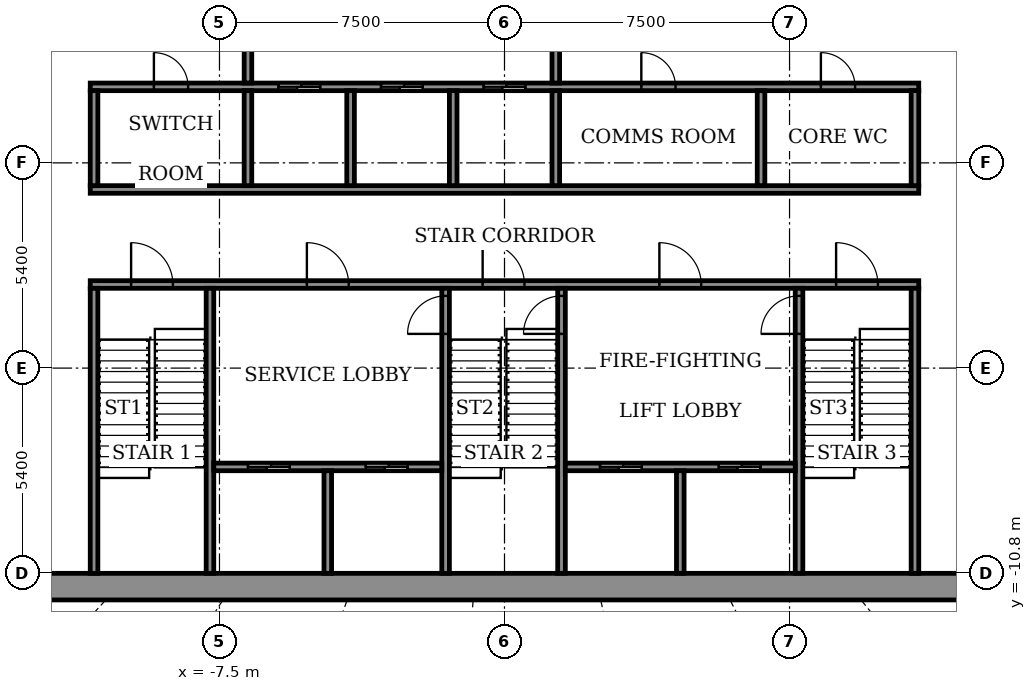
"""IFC4 building model, lengths in metres.
Left out: names, types, materials, properties, quantities, classifications, styles, units other than length and angle.
Written with IfcOpenShell. Run it as: python <this file> out.ifc"""

import sys

from ifc_helpers import new_model, si_unit, direction, frame, frame_2d, origin, place, context, subcontext, project, spatial, rectangle, extrude, element, fill, save


model = new_model("IFC4")
c1 = context("Model", 3, precision=1e-05, world=origin(), true_north=direction((0.0, 1.0)))
c2 = subcontext(c1, "Body", "Model", "MODEL_VIEW")
j1 = project(units=[si_unit("LENGTHUNIT", "METRE"), si_unit("PLANEANGLEUNIT", "RADIAN")], contexts=[c1])
p1 = place(None, origin())
s1 = spatial("IfcSite", under=j1, at=p1, CompositionType="ELEMENT")
p2 = place(p1, origin())
s2 = spatial("IfcBuilding", under=s1, at=p2, CompositionType="ELEMENT")
p3 = place(p2, frame((0.0, 0.0, 275.3)))
s3 = spatial("IfcBuildingStorey", under=s2, at=p3, CompositionType="ELEMENT", Elevation=275.3)
p4 = place(p3, frame((-14.5, -11.15, 0.0), z_axis=(0.0, 0.0, 1.0), x_axis=(1.0, 0.0, 0.0)))
e1 = element("IfcWall", 1, at=p4, inside=s3, PredefinedType="SHEAR", context=c2, shape_type="SweptSolid", body=[
    extrude(rectangle(XDim=29.0, YDim=0.7, at=frame_2d((14.5, 0.0))), origin(), (0.0, 0.0, 1.0), 4.6),
])
p5 = place(p3, frame((-10.9, -3.2, 0.0), z_axis=(0.0, 0.0, 1.0), x_axis=(1.0, 0.0, 0.0)))
e2 = element("IfcWall", 2, at=p5, inside=s3, PredefinedType="SHEAR", context=c2, shape_type="SweptSolid", body=[
    extrude(rectangle(XDim=21.8, YDim=0.2, at=frame_2d((10.9, 0.0))), origin(), (0.0, 0.0, 1.0), 4.05),
])
p6 = place(p5, frame((1.075, 0.0, 0.0)))
e3 = element("IfcOpeningElement", 3, at=p6, cuts=e2, PredefinedType="OPENING", context=c2, shape_type="SweptSolid", body=[
    extrude(rectangle(XDim=1.1, YDim=2.1, at=frame_2d((0.55, 1.05))), frame((0.0, 0.11, 0.0), z_axis=(0.0, -1.0, 0.0), x_axis=(1.0, 0.0, 0.0)), (0.0, 0.0, 1.0), 0.22),
])
p7 = place(p5, frame((10.325, 0.0, 0.0)))
e4 = element("IfcOpeningElement", 4, at=p7, cuts=e2, PredefinedType="OPENING", context=c2, shape_type="SweptSolid", body=[
    extrude(rectangle(XDim=1.1, YDim=2.1, at=frame_2d((0.55, 1.05))), frame((0.0, 0.11, 0.0), z_axis=(0.0, -1.0, 0.0), x_axis=(1.0, 0.0, 0.0)), (0.0, 0.0, 1.0), 0.22),
])
p8 = place(p5, frame((19.625, 0.0, 0.0)))
e5 = element("IfcOpeningElement", 5, at=p8, cuts=e2, PredefinedType="OPENING", context=c2, shape_type="SweptSolid", body=[
    extrude(rectangle(XDim=1.1, YDim=2.1, at=frame_2d((0.55, 1.05))), frame((0.0, 0.11, 0.0), z_axis=(0.0, -1.0, 0.0), x_axis=(1.0, 0.0, 0.0)), (0.0, 0.0, 1.0), 0.22),
])
p9 = place(p5, frame((5.7, 0.0, 0.0)))
e6 = element("IfcOpeningElement", 6, at=p9, cuts=e2, PredefinedType="OPENING", context=c2, shape_type="SweptSolid", body=[
    extrude(rectangle(XDim=1.1, YDim=2.1, at=frame_2d((0.55, 1.05))), frame((0.0, 0.11, 0.0), z_axis=(0.0, -1.0, 0.0), x_axis=(1.0, 0.0, 0.0)), (0.0, 0.0, 1.0), 0.22),
])
p10 = place(p5, frame((14.975, 0.0, 0.0)))
e7 = element("IfcOpeningElement", 7, at=p10, cuts=e2, PredefinedType="OPENING", context=c2, shape_type="SweptSolid", body=[
    extrude(rectangle(XDim=1.1, YDim=2.1, at=frame_2d((0.55, 1.05))), frame((0.0, 0.11, 0.0), z_axis=(0.0, -1.0, 0.0), x_axis=(1.0, 0.0, 0.0)), (0.0, 0.0, 1.0), 0.22),
])
p11 = place(p3, frame((-10.9, -0.7, 0.0), z_axis=(0.0, 0.0, 1.0), x_axis=(1.0, 0.0, 0.0)))
e8 = element("IfcWall", 8, at=p11, inside=s3, PredefinedType="SHEAR", context=c2, shape_type="SweptSolid", body=[
    extrude(rectangle(XDim=21.8, YDim=0.2, at=frame_2d((10.9, 0.0))), origin(), (0.0, 0.0, 1.0), 4.05),
])
p12 = place(p3, frame((-10.9, 2.0, 0.0), z_axis=(0.0, 0.0, 1.0), x_axis=(1.0, 0.0, 0.0)))
e9 = element("IfcWall", 9, at=p12, inside=s3, PredefinedType="SHEAR", context=c2, shape_type="SweptSolid", body=[
    extrude(rectangle(XDim=21.8, YDim=0.2, at=frame_2d((10.9, 0.0))), origin(), (0.0, 0.0, 1.0), 4.05),
])
p13 = place(p12, frame((4.95, 0.0, 0.0)))
e10 = element("IfcOpeningElement", 10, at=p13, cuts=e9, PredefinedType="OPENING", context=c2, shape_type="SweptSolid", body=[
    extrude(rectangle(XDim=1.1, YDim=2.1, at=frame_2d((0.55, 1.05))), frame((0.0, 0.11, 0.0), z_axis=(0.0, -1.0, 0.0), x_axis=(1.0, 0.0, 0.0)), (0.0, 0.0, 1.0), 0.22),
])
p14 = place(p12, frame((7.65, 0.0, 0.0)))
e11 = element("IfcOpeningElement", 11, at=p14, cuts=e9, PredefinedType="OPENING", context=c2, shape_type="SweptSolid", body=[
    extrude(rectangle(XDim=1.1, YDim=2.1, at=frame_2d((0.55, 1.05))), frame((0.0, 0.11, 0.0), z_axis=(0.0, -1.0, 0.0), x_axis=(1.0, 0.0, 0.0)), (0.0, 0.0, 1.0), 0.22),
])
p15 = place(p12, frame((10.35, 0.0, 0.0)))
e12 = element("IfcOpeningElement", 12, at=p15, cuts=e9, PredefinedType="OPENING", context=c2, shape_type="SweptSolid", body=[
    extrude(rectangle(XDim=1.1, YDim=2.1, at=frame_2d((0.55, 1.05))), frame((0.0, 0.11, 0.0), z_axis=(0.0, -1.0, 0.0), x_axis=(1.0, 0.0, 0.0)), (0.0, 0.0, 1.0), 0.22),
])
p16 = place(p12, frame((1.675, 0.0, 0.0)))
e13 = element("IfcOpeningElement", 13, at=p16, cuts=e9, PredefinedType="OPENING", context=c2, shape_type="SweptSolid", body=[
    extrude(rectangle(XDim=0.9, YDim=2.1, at=frame_2d((0.45, 1.05))), frame((0.0, 0.11, 0.0), z_axis=(0.0, -1.0, 0.0), x_axis=(1.0, 0.0, 0.0)), (0.0, 0.0, 1.0), 0.22),
])
p17 = place(p12, frame((14.5, 0.0, 0.0)))
e14 = element("IfcOpeningElement", 14, at=p17, cuts=e9, PredefinedType="OPENING", context=c2, shape_type="SweptSolid", body=[
    extrude(rectangle(XDim=0.9, YDim=2.1, at=frame_2d((0.45, 1.05))), frame((0.0, 0.11, 0.0), z_axis=(0.0, -1.0, 0.0), x_axis=(1.0, 0.0, 0.0)), (0.0, 0.0, 1.0), 0.22),
])
p18 = place(p12, frame((19.225, 0.0, 0.0)))
e15 = element("IfcOpeningElement", 15, at=p18, cuts=e9, PredefinedType="OPENING", context=c2, shape_type="SweptSolid", body=[
    extrude(rectangle(XDim=0.9, YDim=2.1, at=frame_2d((0.45, 1.05))), frame((0.0, 0.11, 0.0), z_axis=(0.0, -1.0, 0.0), x_axis=(1.0, 0.0, 0.0)), (0.0, 0.0, 1.0), 0.22),
])
for number, where, z_axis, x_axis in (
    (16, (-10.8, -10.8, 0.0), (0.0, 0.0, 1.0), (0.0, 1.0, 0.0)),
    (17, (-7.75, -10.8, 0.0), (0.0, 0.0, 1.0), (0.0, 1.0, 0.0)),
):
    element("IfcWall", number, at=place(p3, frame(where, z_axis=z_axis, x_axis=x_axis)), inside=s3, PredefinedType="SHEAR", context=c2, shape_type="SweptSolid", body=[
        extrude(rectangle(XDim=7.5, YDim=0.2, at=frame_2d((3.75, 0.0))), origin(), (0.0, 0.0, 1.0), 4.05),
    ])
p19 = place(p3, frame((-1.55, -10.8, 0.0), z_axis=(0.0, 0.0, 1.0), x_axis=(0.0, 1.0, 0.0)))
e18 = element("IfcWall", 18, at=p19, inside=s3, PredefinedType="SHEAR", context=c2, shape_type="SweptSolid", body=[
    extrude(rectangle(XDim=7.5, YDim=0.2, at=frame_2d((3.75, 0.0))), origin(), (0.0, 0.0, 1.0), 4.05),
])
p20 = place(p19, frame((6.3, 0.0, 0.0)))
e19 = element("IfcOpeningElement", 19, at=p20, cuts=e18, PredefinedType="OPENING", context=c2, shape_type="SweptSolid", body=[
    extrude(rectangle(XDim=1.0, YDim=2.1, at=frame_2d((0.5, 1.05))), frame((0.0, 0.11, 0.0), z_axis=(0.0, -1.0, 0.0), x_axis=(1.0, 0.0, 0.0)), (0.0, 0.0, 1.0), 0.22),
])
p21 = place(p3, frame((1.5, -10.8, 0.0), z_axis=(0.0, 0.0, 1.0), x_axis=(0.0, 1.0, 0.0)))
e20 = element("IfcWall", 20, at=p21, inside=s3, PredefinedType="SHEAR", context=c2, shape_type="SweptSolid", body=[
    extrude(rectangle(XDim=7.5, YDim=0.2, at=frame_2d((3.75, 0.0))), origin(), (0.0, 0.0, 1.0), 4.05),
])
p22 = place(p21, frame((6.3, 0.0, 0.0)))
e21 = element("IfcOpeningElement", 21, at=p22, cuts=e20, PredefinedType="OPENING", context=c2, shape_type="SweptSolid", body=[
    extrude(rectangle(XDim=1.0, YDim=2.1, at=frame_2d((0.5, 1.05))), frame((0.0, 0.11, 0.0), z_axis=(0.0, -1.0, 0.0), x_axis=(1.0, 0.0, 0.0)), (0.0, 0.0, 1.0), 0.22),
])
p23 = place(p3, frame((7.75, -10.8, 0.0), z_axis=(0.0, 0.0, 1.0), x_axis=(0.0, 1.0, 0.0)))
e22 = element("IfcWall", 22, at=p23, inside=s3, PredefinedType="SHEAR", context=c2, shape_type="SweptSolid", body=[
    extrude(rectangle(XDim=7.5, YDim=0.2, at=frame_2d((3.75, 0.0))), origin(), (0.0, 0.0, 1.0), 4.05),
])
p24 = place(p23, frame((6.3, 0.0, 0.0)))
e23 = element("IfcOpeningElement", 23, at=p24, cuts=e22, PredefinedType="OPENING", context=c2, shape_type="SweptSolid", body=[
    extrude(rectangle(XDim=1.0, YDim=2.1, at=frame_2d((0.5, 1.05))), frame((0.0, 0.11, 0.0), z_axis=(0.0, -1.0, 0.0), x_axis=(1.0, 0.0, 0.0)), (0.0, 0.0, 1.0), 0.22),
])
p25 = place(p3, frame((10.8, -10.8, 0.0), z_axis=(0.0, 0.0, 1.0), x_axis=(0.0, 1.0, 0.0)))
e24 = element("IfcWall", 24, at=p25, inside=s3, PredefinedType="SHEAR", context=c2, shape_type="SweptSolid", body=[
    extrude(rectangle(XDim=7.5, YDim=0.2, at=frame_2d((3.75, 0.0))), origin(), (0.0, 0.0, 1.0), 4.05),
])
p26 = place(p3, frame((-7.65, -8.0, 0.0), z_axis=(0.0, 0.0, 1.0), x_axis=(1.0, 0.0, 0.0)))
e25 = element("IfcWall", 25, at=p26, inside=s3, PredefinedType="SHEAR", context=c2, shape_type="SweptSolid", body=[
    extrude(rectangle(XDim=6.0, YDim=0.2, at=frame_2d((3.0, 0.0))), origin(), (0.0, 0.0, 1.0), 4.05),
])
p27 = place(p26, frame((0.9, 0.0, 0.0)))
e26 = element("IfcOpeningElement", 26, at=p27, cuts=e25, PredefinedType="OPENING", context=c2, shape_type="SweptSolid", body=[
    extrude(rectangle(XDim=1.1, YDim=2.1, at=frame_2d((0.55, 1.05))), frame((0.0, 0.11, 0.0), z_axis=(0.0, -1.0, 0.0), x_axis=(1.0, 0.0, 0.0)), (0.0, 0.0, 1.0), 0.22),
])
p28 = place(p26, frame((4.0, 0.0, 0.0)))
e27 = element("IfcOpeningElement", 27, at=p28, cuts=e25, PredefinedType="OPENING", context=c2, shape_type="SweptSolid", body=[
    extrude(rectangle(XDim=1.1, YDim=2.1, at=frame_2d((0.55, 1.05))), frame((0.0, 0.11, 0.0), z_axis=(0.0, -1.0, 0.0), x_axis=(1.0, 0.0, 0.0)), (0.0, 0.0, 1.0), 0.22),
])
p29 = place(p3, frame((-4.65, -10.8, 0.0), z_axis=(0.0, 0.0, 1.0), x_axis=(0.0, 1.0, 0.0)))
e28 = element("IfcWall", 28, at=p29, inside=s3, PredefinedType="SHEAR", context=c2, shape_type="SweptSolid", body=[
    extrude(rectangle(XDim=2.7, YDim=0.2, at=frame_2d((1.35, 0.0))), origin(), (0.0, 0.0, 1.0), 4.05),
])
p30 = place(p3, frame((1.6, -8.0, 0.0), z_axis=(0.0, 0.0, 1.0), x_axis=(1.0, 0.0, 0.0)))
e29 = element("IfcWall", 29, at=p30, inside=s3, PredefinedType="SHEAR", context=c2, shape_type="SweptSolid", body=[
    extrude(rectangle(XDim=6.05, YDim=0.2, at=frame_2d((3.025, 0.0))), origin(), (0.0, 0.0, 1.0), 4.05),
])
p31 = place(p30, frame((0.913, 0.0, 0.0)))
e30 = element("IfcOpeningElement", 30, at=p31, cuts=e29, PredefinedType="OPENING", context=c2, shape_type="SweptSolid", body=[
    extrude(rectangle(XDim=1.1, YDim=2.1, at=frame_2d((0.55, 1.05))), frame((0.0, 0.11, 0.0), z_axis=(0.0, -1.0, 0.0), x_axis=(1.0, 0.0, 0.0)), (0.0, 0.0, 1.0), 0.22),
])
p32 = place(p30, frame((4.038, 0.0, 0.0)))
e31 = element("IfcOpeningElement", 31, at=p32, cuts=e29, PredefinedType="OPENING", context=c2, shape_type="SweptSolid", body=[
    extrude(rectangle(XDim=1.1, YDim=2.1, at=frame_2d((0.55, 1.05))), frame((0.0, 0.11, 0.0), z_axis=(0.0, -1.0, 0.0), x_axis=(1.0, 0.0, 0.0)), (0.0, 0.0, 1.0), 0.22),
])
p33 = place(p3, frame((4.625, -10.8, 0.0), z_axis=(0.0, 0.0, 1.0), x_axis=(0.0, 1.0, 0.0)))
e32 = element("IfcWall", 32, at=p33, inside=s3, PredefinedType="SHEAR", context=c2, shape_type="SweptSolid", body=[
    extrude(rectangle(XDim=2.7, YDim=0.2, at=frame_2d((1.35, 0.0))), origin(), (0.0, 0.0, 1.0), 4.05),
])
p34 = place(p3, frame((-10.8, -0.6, 0.0), z_axis=(0.0, 0.0, 1.0), x_axis=(0.0, 1.0, 0.0)))
e33 = element("IfcWall", 33, at=p34, inside=s3, PredefinedType="STANDARD", context=c2, shape_type="SweptSolid", body=[
    extrude(rectangle(XDim=2.5, YDim=0.2, at=frame_2d((1.25, 0.0))), origin(), (0.0, 0.0, 1.0), 4.05),
])
for number, where, z_axis, x_axis in (
    (34, (-6.75, -0.6, 0.0), (0.0, 0.0, 1.0), (0.0, 1.0, 0.0)),
    (35, (-4.05, -0.6, 0.0), (0.0, 0.0, 1.0), (0.0, 1.0, 0.0)),
    (36, (-1.35, -0.6, 0.0), (0.0, 0.0, 1.0), (0.0, 1.0, 0.0)),
    (37, (1.35, -0.6, 0.0), (0.0, 0.0, 1.0), (0.0, 1.0, 0.0)),
):
    element("IfcWall", number, at=place(p3, frame(where, z_axis=z_axis, x_axis=x_axis)), inside=s3, PredefinedType="SHEAR", context=c2, shape_type="SweptSolid", body=[
        extrude(rectangle(XDim=2.5, YDim=0.2, at=frame_2d((1.25, 0.0))), origin(), (0.0, 0.0, 1.0), 4.05),
    ])
for number, where, z_axis, x_axis in (
    (38, (6.75, -0.6, 0.0), (0.0, 0.0, 1.0), (0.0, 1.0, 0.0)),
    (39, (10.8, -0.6, 0.0), (0.0, 0.0, 1.0), (0.0, 1.0, 0.0)),
):
    element("IfcWall", number, at=place(p3, frame(where, z_axis=z_axis, x_axis=x_axis)), inside=s3, PredefinedType="STANDARD", context=c2, shape_type="SweptSolid", body=[
        extrude(rectangle(XDim=2.5, YDim=0.2, at=frame_2d((1.25, 0.0))), origin(), (0.0, 0.0, 1.0), 4.05),
    ])
p35 = place(p3, frame((-6.75, 2.1, 0.0), z_axis=(0.0, 0.0, 1.0), x_axis=(0.0, 1.0, 0.0)))
e40 = element("IfcWall", 40, at=p35, inside=s3, PredefinedType="STANDARD", context=c2, shape_type="SweptSolid", body=[
    extrude(rectangle(XDim=5.9, YDim=0.2, at=frame_2d((2.95, 0.0))), origin(), (0.0, 0.0, 1.0), 4.05),
])
p36 = place(p35, frame((2.35, 0.0, 0.0)))
e41 = element("IfcOpeningElement", 41, at=p36, cuts=e40, PredefinedType="OPENING", context=c2, shape_type="SweptSolid", body=[
    extrude(rectangle(XDim=1.2, YDim=2.1, at=frame_2d((0.6, 1.05))), frame((0.0, 0.11, 0.0), z_axis=(0.0, -1.0, 0.0), x_axis=(1.0, 0.0, 0.0)), (0.0, 0.0, 1.0), 0.22),
])
p37 = place(p3, frame((1.35, 2.1, 0.0), z_axis=(0.0, 0.0, 1.0), x_axis=(0.0, 1.0, 0.0)))
e42 = element("IfcWall", 42, at=p37, inside=s3, PredefinedType="STANDARD", context=c2, shape_type="SweptSolid", body=[
    extrude(rectangle(XDim=5.9, YDim=0.2, at=frame_2d((2.95, 0.0))), origin(), (0.0, 0.0, 1.0), 4.05),
])
p38 = place(p37, frame((2.35, 0.0, 0.0)))
e43 = element("IfcOpeningElement", 43, at=p38, cuts=e42, PredefinedType="OPENING", context=c2, shape_type="SweptSolid", body=[
    extrude(rectangle(XDim=1.2, YDim=2.1, at=frame_2d((0.6, 1.05))), frame((0.0, 0.11, 0.0), z_axis=(0.0, -1.0, 0.0), x_axis=(1.0, 0.0, 0.0)), (0.0, 0.0, 1.0), 0.22),
])
p39 = place(p13, origin())
e44 = element("IfcDoor", 44, at=p39, inside=s3, OperationType="SLIDING_TO_LEFT", PredefinedType="DOOR", context=c2, shape_type="SweptSolid", body=[
    extrude(rectangle(XDim=1.1, YDim=2.1, at=frame_2d((0.55, 1.05))), frame((0.0, 0.025, 0.0), z_axis=(0.0, -1.0, 0.0), x_axis=(1.0, 0.0, 0.0)), (0.0, 0.0, 1.0), 0.05),
])
fill(e10, e44)
p40 = place(p14, origin())
e45 = element("IfcDoor", 45, at=p40, inside=s3, OperationType="SLIDING_TO_LEFT", PredefinedType="DOOR", context=c2, shape_type="SweptSolid", body=[
    extrude(rectangle(XDim=1.1, YDim=2.1, at=frame_2d((0.55, 1.05))), frame((0.0, 0.025, 0.0), z_axis=(0.0, -1.0, 0.0), x_axis=(1.0, 0.0, 0.0)), (0.0, 0.0, 1.0), 0.05),
])
fill(e11, e45)
p41 = place(p15, origin())
e46 = element("IfcDoor", 46, at=p41, inside=s3, OperationType="SLIDING_TO_LEFT", PredefinedType="DOOR", context=c2, shape_type="SweptSolid", body=[
    extrude(rectangle(XDim=1.1, YDim=2.1, at=frame_2d((0.55, 1.05))), frame((0.0, 0.025, 0.0), z_axis=(0.0, -1.0, 0.0), x_axis=(1.0, 0.0, 0.0)), (0.0, 0.0, 1.0), 0.05),
])
fill(e12, e46)
p42 = place(p16, origin())
e47 = element("IfcDoor", 47, at=p42, inside=s3, OperationType="SINGLE_SWING_LEFT", PredefinedType="DOOR", context=c2, shape_type="SweptSolid", body=[
    extrude(rectangle(XDim=0.9, YDim=2.1, at=frame_2d((0.45, 1.05))), frame((0.0, 0.025, 0.0), z_axis=(0.0, -1.0, 0.0), x_axis=(1.0, 0.0, 0.0)), (0.0, 0.0, 1.0), 0.05),
])
fill(e13, e47)
p43 = place(p17, origin())
e48 = element("IfcDoor", 48, at=p43, inside=s3, OperationType="SINGLE_SWING_LEFT", PredefinedType="DOOR", context=c2, shape_type="SweptSolid", body=[
    extrude(rectangle(XDim=0.9, YDim=2.1, at=frame_2d((0.45, 1.05))), frame((0.0, 0.025, 0.0), z_axis=(0.0, -1.0, 0.0), x_axis=(1.0, 0.0, 0.0)), (0.0, 0.0, 1.0), 0.05),
])
fill(e14, e48)
p44 = place(p18, origin())
e49 = element("IfcDoor", 49, at=p44, inside=s3, OperationType="SINGLE_SWING_RIGHT", PredefinedType="DOOR", context=c2, shape_type="SweptSolid", body=[
    extrude(rectangle(XDim=0.9, YDim=2.1, at=frame_2d((0.45, 1.05))), frame((0.0, 0.025, 0.0), z_axis=(0.0, -1.0, 0.0), x_axis=(1.0, 0.0, 0.0)), (0.0, 0.0, 1.0), 0.05),
])
fill(e15, e49)
p45 = place(p31, origin())
e50 = element("IfcDoor", 50, at=p45, inside=s3, OperationType="SLIDING_TO_LEFT", PredefinedType="DOOR", context=c2, shape_type="SweptSolid", body=[
    extrude(rectangle(XDim=1.1, YDim=2.1, at=frame_2d((0.55, 1.05))), frame((0.0, 0.025, 0.0), z_axis=(0.0, -1.0, 0.0), x_axis=(1.0, 0.0, 0.0)), (0.0, 0.0, 1.0), 0.05),
])
fill(e30, e50)
p46 = place(p27, origin())
e51 = element("IfcDoor", 51, at=p46, inside=s3, OperationType="SLIDING_TO_LEFT", PredefinedType="DOOR", context=c2, shape_type="SweptSolid", body=[
    extrude(rectangle(XDim=1.1, YDim=2.1, at=frame_2d((0.55, 1.05))), frame((0.0, 0.025, 0.0), z_axis=(0.0, -1.0, 0.0), x_axis=(1.0, 0.0, 0.0)), (0.0, 0.0, 1.0), 0.05),
])
fill(e26, e51)
p47 = place(p32, origin())
e52 = element("IfcDoor", 52, at=p47, inside=s3, OperationType="SLIDING_TO_LEFT", PredefinedType="DOOR", context=c2, shape_type="SweptSolid", body=[
    extrude(rectangle(XDim=1.1, YDim=2.1, at=frame_2d((0.55, 1.05))), frame((0.0, 0.025, 0.0), z_axis=(0.0, -1.0, 0.0), x_axis=(1.0, 0.0, 0.0)), (0.0, 0.0, 1.0), 0.05),
])
fill(e31, e52)
p48 = place(p28, origin())
e53 = element("IfcDoor", 53, at=p48, inside=s3, OperationType="SLIDING_TO_LEFT", PredefinedType="DOOR", context=c2, shape_type="SweptSolid", body=[
    extrude(rectangle(XDim=1.1, YDim=2.1, at=frame_2d((0.55, 1.05))), frame((0.0, 0.025, 0.0), z_axis=(0.0, -1.0, 0.0), x_axis=(1.0, 0.0, 0.0)), (0.0, 0.0, 1.0), 0.05),
])
fill(e27, e53)
p49 = place(p6, origin())
e54 = element("IfcDoor", 54, at=p49, inside=s3, OperationType="SINGLE_SWING_RIGHT", PredefinedType="DOOR", context=c2, shape_type="SweptSolid", body=[
    extrude(rectangle(XDim=1.1, YDim=2.1, at=frame_2d((0.55, 1.05))), frame((0.0, 0.025, 0.0), z_axis=(0.0, -1.0, 0.0), x_axis=(1.0, 0.0, 0.0)), (0.0, 0.0, 1.0), 0.05),
])
fill(e3, e54)
p50 = place(p7, origin())
e55 = element("IfcDoor", 55, at=p50, inside=s3, OperationType="SINGLE_SWING_RIGHT", PredefinedType="DOOR", context=c2, shape_type="SweptSolid", body=[
    extrude(rectangle(XDim=1.1, YDim=2.1, at=frame_2d((0.55, 1.05))), frame((0.0, 0.025, 0.0), z_axis=(0.0, -1.0, 0.0), x_axis=(1.0, 0.0, 0.0)), (0.0, 0.0, 1.0), 0.05),
])
fill(e4, e55)
p51 = place(p8, origin())
e56 = element("IfcDoor", 56, at=p51, inside=s3, OperationType="SINGLE_SWING_RIGHT", PredefinedType="DOOR", context=c2, shape_type="SweptSolid", body=[
    extrude(rectangle(XDim=1.1, YDim=2.1, at=frame_2d((0.55, 1.05))), frame((0.0, 0.025, 0.0), z_axis=(0.0, -1.0, 0.0), x_axis=(1.0, 0.0, 0.0)), (0.0, 0.0, 1.0), 0.05),
])
fill(e5, e56)
p52 = place(p9, origin())
e57 = element("IfcDoor", 57, at=p52, inside=s3, OperationType="SINGLE_SWING_LEFT", PredefinedType="DOOR", context=c2, shape_type="SweptSolid", body=[
    extrude(rectangle(XDim=1.1, YDim=2.1, at=frame_2d((0.55, 1.05))), frame((0.0, 0.025, 0.0), z_axis=(0.0, -1.0, 0.0), x_axis=(1.0, 0.0, 0.0)), (0.0, 0.0, 1.0), 0.05),
])
fill(e6, e57)
p53 = place(p10, origin())
e58 = element("IfcDoor", 58, at=p53, inside=s3, OperationType="SINGLE_SWING_LEFT", PredefinedType="DOOR", context=c2, shape_type="SweptSolid", body=[
    extrude(rectangle(XDim=1.1, YDim=2.1, at=frame_2d((0.55, 1.05))), frame((0.0, 0.025, 0.0), z_axis=(0.0, -1.0, 0.0), x_axis=(1.0, 0.0, 0.0)), (0.0, 0.0, 1.0), 0.05),
])
fill(e7, e58)
p54 = place(p20, origin())
e59 = element("IfcDoor", 59, at=p54, inside=s3, OperationType="SINGLE_SWING_RIGHT", PredefinedType="DOOR", context=c2, shape_type="SweptSolid", body=[
    extrude(rectangle(XDim=1.0, YDim=2.1, at=frame_2d((0.5, 1.05))), frame((0.0, 0.025, 0.0), z_axis=(0.0, -1.0, 0.0), x_axis=(1.0, 0.0, 0.0)), (0.0, 0.0, 1.0), 0.05),
])
fill(e19, e59)
p55 = place(p22, origin())
e60 = element("IfcDoor", 60, at=p55, inside=s3, OperationType="SINGLE_SWING_RIGHT", PredefinedType="DOOR", context=c2, shape_type="SweptSolid", body=[
    extrude(rectangle(XDim=1.0, YDim=2.1, at=frame_2d((0.5, 1.05))), frame((0.0, 0.025, 0.0), z_axis=(0.0, -1.0, 0.0), x_axis=(1.0, 0.0, 0.0)), (0.0, 0.0, 1.0), 0.05),
])
fill(e21, e60)
p56 = place(p24, origin())
e61 = element("IfcDoor", 61, at=p56, inside=s3, OperationType="SINGLE_SWING_RIGHT", PredefinedType="DOOR", context=c2, shape_type="SweptSolid", body=[
    extrude(rectangle(XDim=1.0, YDim=2.1, at=frame_2d((0.5, 1.05))), frame((0.0, 0.025, 0.0), z_axis=(0.0, -1.0, 0.0), x_axis=(1.0, 0.0, 0.0)), (0.0, 0.0, 1.0), 0.05),
])
fill(e23, e61)
save(model, sys.argv[1])
